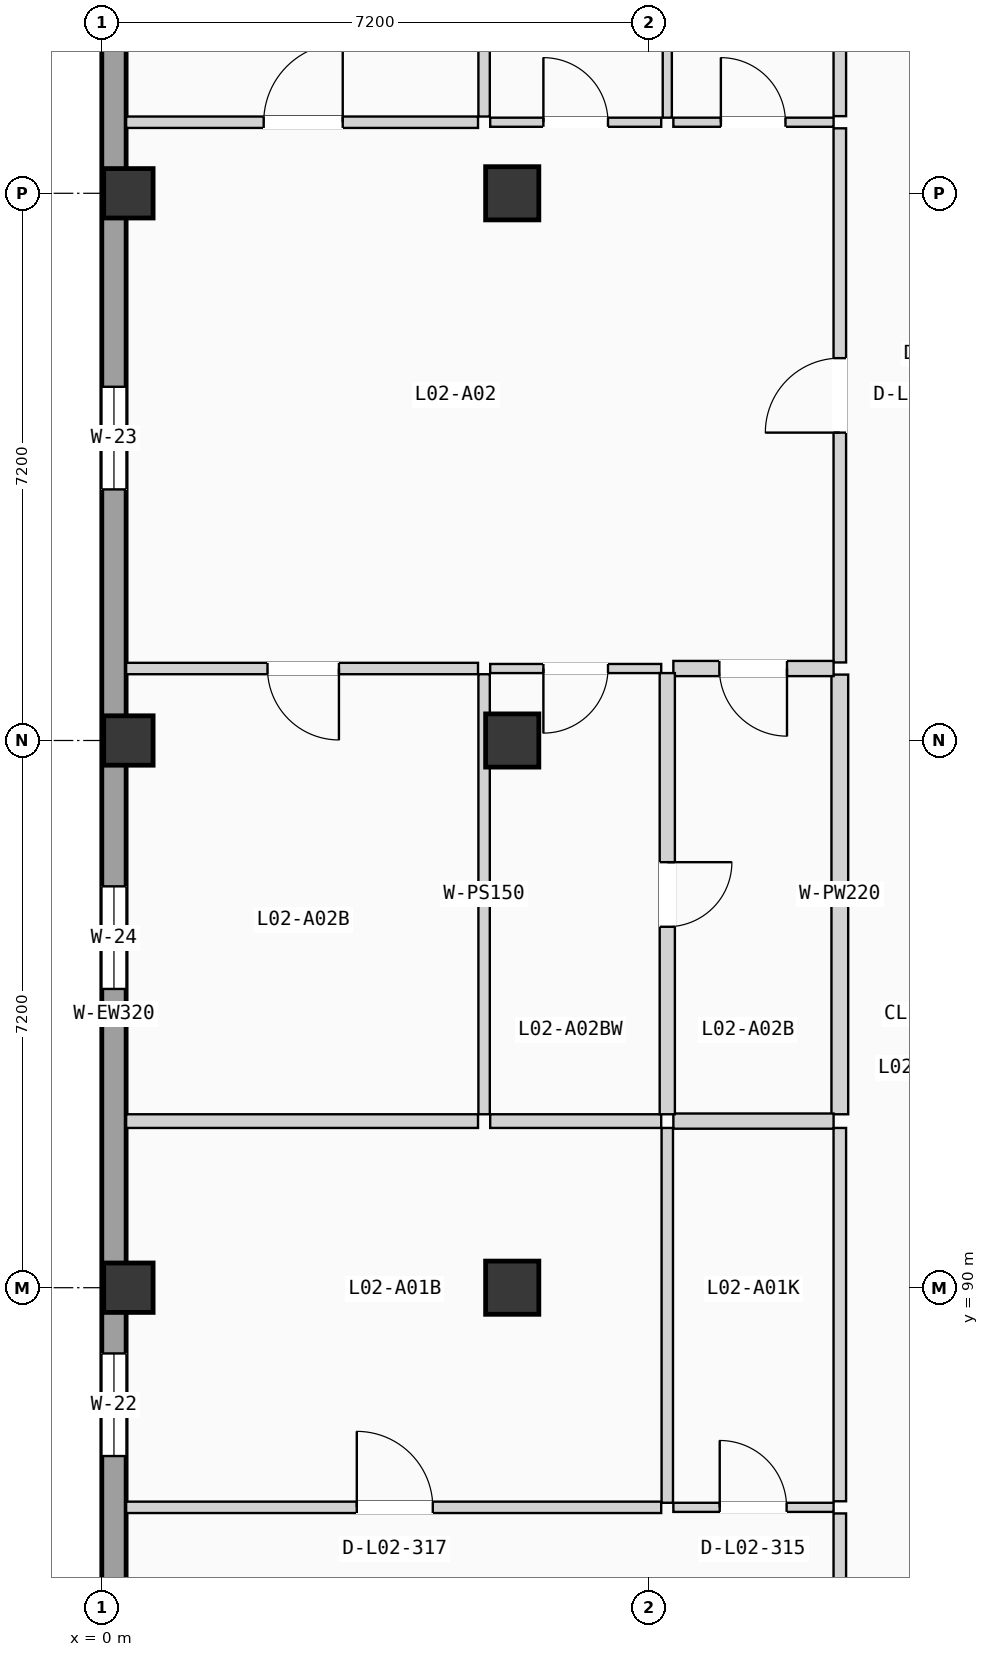
"""IFC4 building model, lengths in metres.
Left out: names, types, materials, properties, quantities, classifications, styles, units other than length and angle.
Written with IfcOpenShell. Run it as: python <this file> out.ifc"""

import sys

from ifc_helpers import new_model, si_unit, direction, frame, frame_2d, origin, origin_2d, place, context, subcontext, project, spatial, rectangle, extrude, element, fill, save


model = new_model("IFC4")
c1 = context("Model", 3, precision=1e-05, world=origin(), true_north=direction((0.0, 1.0)))
c2 = subcontext(c1, "Body", "Model", "MODEL_VIEW")
j1 = project(units=[si_unit("LENGTHUNIT", "METRE"), si_unit("PLANEANGLEUNIT", "RADIAN")], contexts=[c1])
p1 = place(None, origin())
s1 = spatial("IfcSite", under=j1, at=p1, CompositionType="ELEMENT")
p2 = place(p1, origin())
s2 = spatial("IfcBuilding", under=s1, at=p2, CompositionType="ELEMENT")
p3 = place(p2, frame((0.0, 0.0, 8.575)))
s3 = spatial("IfcBuildingStorey", under=s2, at=p3, CompositionType="ELEMENT", Elevation=8.575)
for number, where, z_axis, x_axis in (
    (1, (0.35, 90.0, 0.0), (0.0, 0.0, 1.0), (1.0, 0.0, 0.0)),
    (2, (0.35, 97.2, 0.0), (0.0, 0.0, 1.0), (1.0, 0.0, 0.0)),
    (3, (0.35, 104.4, 0.0), (0.0, 0.0, 1.0), (1.0, 0.0, 0.0)),
):
    element("IfcColumn", number, at=place(p3, frame(where, z_axis=z_axis, x_axis=x_axis)), inside=s3, PredefinedType="COLUMN", context=c2, shape_type="SweptSolid", body=[
        extrude(rectangle(XDim=0.65, YDim=0.65, at=origin_2d()), origin(), (0.0, 0.0, 1.0), 3.5),
    ])
for number, where, z_axis, x_axis in (
    (4, (5.4, 90.0, 0.0), (0.0, 0.0, 1.0), (1.0, 0.0, 0.0)),
    (5, (5.4, 97.2, 0.0), (0.0, 0.0, 1.0), (1.0, 0.0, 0.0)),
    (6, (5.4, 104.4, 0.0), (0.0, 0.0, 1.0), (1.0, 0.0, 0.0)),
):
    element("IfcColumn", number, at=place(p3, frame(where, z_axis=z_axis, x_axis=x_axis)), inside=s3, PredefinedType="COLUMN", context=c2, shape_type="SweptSolid", body=[
        extrude(rectangle(XDim=0.7, YDim=0.7, at=origin_2d()), origin(), (0.0, 0.0, 1.0), 3.5),
    ])
p4 = place(p3, frame((0.16, 68.72, 0.0), z_axis=(0.0, 0.0, 1.0), x_axis=(0.0, 1.0, 0.0)))
e7 = element("IfcWall", 7, at=p4, inside=s3, PredefinedType="SOLIDWALL", context=c2, shape_type="SweptSolid", body=[
    extrude(rectangle(XDim=49.76, YDim=0.32, at=frame_2d((24.88, 0.0))), origin(), (0.0, 0.0, 1.0), 3.24),
])
p5 = place(p4, frame((15.705, 0.0, 0.755)))
e8 = element("IfcOpeningElement", 8, at=p5, cuts=e7, PredefinedType="OPENING", context=c2, shape_type="SweptSolid", body=[
    extrude(rectangle(XDim=1.25, YDim=1.8, at=frame_2d((0.625, 0.9))), frame((0.0, 0.17, 0.0), z_axis=(0.0, -1.0, 0.0), x_axis=(1.0, 0.0, 0.0)), (0.0, 0.0, 1.0), 0.34),
])
p6 = place(p4, frame((9.061, 0.0, 0.9)))
e9 = element("IfcOpeningElement", 9, at=p6, cuts=e7, PredefinedType="OPENING", context=c2, shape_type="SweptSolid", body=[
    extrude(rectangle(XDim=1.35, YDim=1.2, at=frame_2d((0.675, 0.6))), frame((0.0, 0.17, 0.0), z_axis=(0.0, -1.0, 0.0), x_axis=(1.0, 0.0, 0.0)), (0.0, 0.0, 1.0), 0.34),
])
p7 = place(p4, frame((19.065, 0.0, 0.9)))
e10 = element("IfcOpeningElement", 10, at=p7, cuts=e7, PredefinedType="OPENING", context=c2, shape_type="SweptSolid", body=[
    extrude(rectangle(XDim=1.35, YDim=1.35, at=frame_2d((0.675, 0.675))), frame((0.0, 0.17, 0.0), z_axis=(0.0, -1.0, 0.0), x_axis=(1.0, 0.0, 0.0)), (0.0, 0.0, 1.0), 0.34),
])
p8 = place(p4, frame((31.784, 0.0, 0.9)))
e11 = element("IfcOpeningElement", 11, at=p8, cuts=e7, PredefinedType="OPENING", context=c2, shape_type="SweptSolid", body=[
    extrude(rectangle(XDim=1.35, YDim=1.5, at=frame_2d((0.675, 0.75))), frame((0.0, 0.17, 0.0), z_axis=(0.0, -1.0, 0.0), x_axis=(1.0, 0.0, 0.0)), (0.0, 0.0, 1.0), 0.34),
])
p9 = place(p4, frame((25.211, 0.0, 0.9)))
e12 = element("IfcOpeningElement", 12, at=p9, cuts=e7, PredefinedType="OPENING", context=c2, shape_type="SweptSolid", body=[
    extrude(rectangle(XDim=1.35, YDim=1.65, at=frame_2d((0.675, 0.825))), frame((0.0, 0.17, 0.0), z_axis=(0.0, -1.0, 0.0), x_axis=(1.0, 0.0, 0.0)), (0.0, 0.0, 1.0), 0.34),
])
p10 = place(p4, frame((38.913, 0.0, 0.755)))
e13 = element("IfcOpeningElement", 13, at=p10, cuts=e7, PredefinedType="OPENING", context=c2, shape_type="SweptSolid", body=[
    extrude(rectangle(XDim=1.35, YDim=1.8, at=frame_2d((0.675, 0.9))), frame((0.0, 0.17, 0.0), z_axis=(0.0, -1.0, 0.0), x_axis=(1.0, 0.0, 0.0)), (0.0, 0.0, 1.0), 0.34),
])
p11 = place(p3, frame((9.71, 81.072, 0.0), z_axis=(0.0, 0.0, 1.0), x_axis=(0.0, 1.0, 0.0)))
e14 = element("IfcWall", 14, at=p11, inside=s3, PredefinedType="PARTITIONING", context=c2, shape_type="SweptSolid", body=[
    extrude(rectangle(XDim=5.958, YDim=0.165, at=frame_2d((2.979, 0.0))), origin(), (0.0, 0.0, 1.0), 3.22),
])
p12 = place(p11, frame((2.489, 0.0, 0.0)))
e15 = element("IfcOpeningElement", 15, at=p12, cuts=e14, PredefinedType="OPENING", context=c2, shape_type="SweptSolid", body=[
    extrude(rectangle(XDim=0.98, YDim=2.08, at=frame_2d((0.49, 1.04))), frame((0.0, 0.093, 0.0), z_axis=(0.0, -1.0, 0.0), x_axis=(1.0, 0.0, 0.0)), (0.0, 0.0, 1.0), 0.185),
])
p13 = place(p3, frame((9.71, 87.19, 0.0), z_axis=(0.0, 0.0, 1.0), x_axis=(0.0, 1.0, 0.0)))
e16 = element("IfcWall", 16, at=p13, inside=s3, PredefinedType="PARTITIONING", context=c2, shape_type="SweptSolid", body=[
    extrude(rectangle(XDim=4.912, YDim=0.165, at=frame_2d((2.456, 0.0))), origin(), (0.0, 0.0, 1.0), 3.22),
])
p14 = place(p3, frame((9.71, 98.227, 0.0), z_axis=(0.0, 0.0, 1.0), x_axis=(0.0, 1.0, 0.0)))
e17 = element("IfcWall", 17, at=p14, inside=s3, PredefinedType="PARTITIONING", context=c2, shape_type="SweptSolid", body=[
    extrude(rectangle(XDim=7.028, YDim=0.165, at=frame_2d((3.514, 0.0))), origin(), (0.0, 0.0, 1.0), 3.22),
])
p15 = place(p14, frame((3.024, 0.0, 0.0)))
e18 = element("IfcOpeningElement", 18, at=p15, cuts=e17, PredefinedType="OPENING", context=c2, shape_type="SweptSolid", body=[
    extrude(rectangle(XDim=0.98, YDim=2.08, at=frame_2d((0.49, 1.04))), frame((0.0, 0.093, 0.0), z_axis=(0.0, -1.0, 0.0), x_axis=(1.0, 0.0, 0.0)), (0.0, 0.0, 1.0), 0.185),
])
p16 = place(p3, frame((9.71, 92.282, 0.0), z_axis=(0.0, 0.0, 1.0), x_axis=(0.0, 1.0, 0.0)))
e19 = element("IfcWall", 19, at=p16, inside=s3, PredefinedType="PLUMBINGWALL", context=c2, shape_type="SweptSolid", body=[
    extrude(rectangle(XDim=5.785, YDim=0.22, at=frame_2d((2.893, 0.0))), origin(), (0.0, 0.0, 1.0), 3.22),
])
p17 = place(p3, frame((9.71, 105.415, 0.0), z_axis=(0.0, 0.0, 1.0), x_axis=(0.0, 1.0, 0.0)))
e20 = element("IfcWall", 20, at=p17, inside=s3, PredefinedType="PARTITIONING", context=c2, shape_type="SweptSolid", body=[
    extrude(rectangle(XDim=5.785, YDim=0.165, at=frame_2d((2.893, 0.0))), origin(), (0.0, 0.0, 1.0), 3.22),
])
p18 = place(p3, frame((7.52, 87.11, 0.0), z_axis=(0.0, 0.0, 1.0), x_axis=(1.0, 0.0, 0.0)))
e21 = element("IfcWall", 21, at=p18, inside=s3, PredefinedType="PARTITIONING", context=c2, shape_type="SweptSolid", body=[
    extrude(rectangle(XDim=2.108, YDim=0.12, at=frame_2d((1.054, 0.0))), origin(), (0.0, 0.0, 1.0), 3.22),
])
p19 = place(p18, frame((0.61, 0.0, 0.0)))
e22 = element("IfcOpeningElement", 22, at=p19, cuts=e21, PredefinedType="OPENING", context=c2, shape_type="SweptSolid", body=[
    extrude(rectangle(XDim=0.88, YDim=2.02, at=frame_2d((0.44, 1.01))), frame((0.0, 0.07, 0.0), z_axis=(0.0, -1.0, 0.0), x_axis=(1.0, 0.0, 0.0)), (0.0, 0.0, 1.0), 0.14),
])
p20 = place(p3, frame((0.32, 87.11, 0.0), z_axis=(0.0, 0.0, 1.0), x_axis=(1.0, 0.0, 0.0)))
e23 = element("IfcWall", 23, at=p20, inside=s3, PredefinedType="PARTITIONING", context=c2, shape_type="SweptSolid", body=[
    extrude(rectangle(XDim=7.04, YDim=0.15, at=frame_2d((3.52, 0.0))), origin(), (0.0, 0.0, 1.0), 3.22),
])
p21 = place(p20, frame((3.035, 0.0, 0.0)))
e24 = element("IfcOpeningElement", 24, at=p21, cuts=e23, PredefinedType="OPENING", context=c2, shape_type="SweptSolid", body=[
    extrude(rectangle(XDim=1.0, YDim=2.06, at=frame_2d((0.5, 1.03))), frame((0.0, 0.085, 0.0), z_axis=(0.0, -1.0, 0.0), x_axis=(1.0, 0.0, 0.0)), (0.0, 0.0, 1.0), 0.17),
])
p22 = place(p3, frame((7.44, 87.17, 0.0), z_axis=(0.0, 0.0, 1.0), x_axis=(0.0, 1.0, 0.0)))
e25 = element("IfcWall", 25, at=p22, inside=s3, PredefinedType="PARTITIONING", context=c2, shape_type="SweptSolid", body=[
    extrude(rectangle(XDim=4.932, YDim=0.15, at=frame_2d((2.466, 0.0))), origin(), (0.0, 0.0, 1.0), 3.22),
])
p23 = place(p3, frame((7.52, 92.192, 0.0), z_axis=(0.0, 0.0, 1.0), x_axis=(1.0, 0.0, 0.0)))
e26 = element("IfcWall", 26, at=p23, inside=s3, PredefinedType="PLUMBINGWALL", context=c2, shape_type="SweptSolid", body=[
    extrude(rectangle(XDim=2.108, YDim=0.2, at=frame_2d((1.054, 0.0))), origin(), (0.0, 0.0, 1.0), 3.22),
])
p24 = place(p3, frame((0.32, 92.192, 0.0), z_axis=(0.0, 0.0, 1.0), x_axis=(1.0, 0.0, 0.0)))
e27 = element("IfcWall", 27, at=p24, inside=s3, PredefinedType="PARTITIONING", context=c2, shape_type="SweptSolid", body=[
    extrude(rectangle(XDim=4.63, YDim=0.18, at=frame_2d((2.315, 0.0))), origin(), (0.0, 0.0, 1.0), 3.22),
])
p25 = place(p3, frame((5.11, 92.192, 0.0), z_axis=(0.0, 0.0, 1.0), x_axis=(1.0, 0.0, 0.0)))
e28 = element("IfcWall", 28, at=p25, inside=s3, PredefinedType="PARTITIONING", context=c2, shape_type="SweptSolid", body=[
    extrude(rectangle(XDim=2.25, YDim=0.18, at=frame_2d((1.125, 0.0))), origin(), (0.0, 0.0, 1.0), 3.22),
])
p26 = place(p3, frame((7.52, 98.147, 0.0), z_axis=(0.0, 0.0, 1.0), x_axis=(1.0, 0.0, 0.0)))
e29 = element("IfcWall", 29, at=p26, inside=s3, PredefinedType="PLUMBINGWALL", context=c2, shape_type="SweptSolid", body=[
    extrude(rectangle(XDim=2.108, YDim=0.2, at=frame_2d((1.054, 0.0))), origin(), (0.0, 0.0, 1.0), 3.22),
])
p27 = place(p26, frame((0.605, 0.0, 0.0)))
e30 = element("IfcOpeningElement", 30, at=p27, cuts=e29, PredefinedType="OPENING", context=c2, shape_type="SweptSolid", body=[
    extrude(rectangle(XDim=0.89, YDim=2.03, at=frame_2d((0.445, 1.015))), frame((0.0, 0.11, 0.0), z_axis=(0.0, -1.0, 0.0), x_axis=(1.0, 0.0, 0.0)), (0.0, 0.0, 1.0), 0.22),
])
p28 = place(p3, frame((7.52, 105.335, 0.0), z_axis=(0.0, 0.0, 1.0), x_axis=(1.0, 0.0, 0.0)))
e31 = element("IfcWall", 31, at=p28, inside=s3, PredefinedType="PARTITIONING", context=c2, shape_type="SweptSolid", body=[
    extrude(rectangle(XDim=2.108, YDim=0.12, at=frame_2d((1.054, 0.0))), origin(), (0.0, 0.0, 1.0), 3.22),
])
p29 = place(p28, frame((0.625, 0.0, 0.0)))
e32 = element("IfcOpeningElement", 32, at=p29, cuts=e31, PredefinedType="OPENING", context=c2, shape_type="SweptSolid", body=[
    extrude(rectangle(XDim=0.85, YDim=2.01, at=frame_2d((0.425, 1.005))), frame((0.0, 0.07, 0.0), z_axis=(0.0, -1.0, 0.0), x_axis=(1.0, 0.0, 0.0)), (0.0, 0.0, 1.0), 0.14),
])
p30 = place(p3, frame((0.32, 98.147, 0.0), z_axis=(0.0, 0.0, 1.0), x_axis=(1.0, 0.0, 0.0)))
e33 = element("IfcWall", 33, at=p30, inside=s3, PredefinedType="PARTITIONING", context=c2, shape_type="SweptSolid", body=[
    extrude(rectangle(XDim=4.63, YDim=0.15, at=frame_2d((2.315, 0.0))), origin(), (0.0, 0.0, 1.0), 3.22),
])
p31 = place(p30, frame((1.86, 0.0, 0.0)))
e34 = element("IfcOpeningElement", 34, at=p31, cuts=e33, PredefinedType="OPENING", context=c2, shape_type="SweptSolid", body=[
    extrude(rectangle(XDim=0.94, YDim=2.06, at=frame_2d((0.47, 1.03))), frame((0.0, 0.085, 0.0), z_axis=(0.0, -1.0, 0.0), x_axis=(1.0, 0.0, 0.0)), (0.0, 0.0, 1.0), 0.17),
])
p32 = place(p3, frame((5.11, 98.147, 0.0), z_axis=(0.0, 0.0, 1.0), x_axis=(1.0, 0.0, 0.0)))
e35 = element("IfcWall", 35, at=p32, inside=s3, PredefinedType="PARTITIONING", context=c2, shape_type="SweptSolid", body=[
    extrude(rectangle(XDim=2.25, YDim=0.12, at=frame_2d((1.125, 0.0))), origin(), (0.0, 0.0, 1.0), 3.22),
])
p33 = place(p32, frame((0.7, 0.0, 0.0)))
e36 = element("IfcOpeningElement", 36, at=p33, cuts=e35, PredefinedType="OPENING", context=c2, shape_type="SweptSolid", body=[
    extrude(rectangle(XDim=0.85, YDim=2.01, at=frame_2d((0.425, 1.005))), frame((0.0, 0.07, 0.0), z_axis=(0.0, -1.0, 0.0), x_axis=(1.0, 0.0, 0.0)), (0.0, 0.0, 1.0), 0.14),
])
p34 = place(p3, frame((0.32, 105.335, 0.0), z_axis=(0.0, 0.0, 1.0), x_axis=(1.0, 0.0, 0.0)))
e37 = element("IfcWall", 37, at=p34, inside=s3, PredefinedType="PARTITIONING", context=c2, shape_type="SweptSolid", body=[
    extrude(rectangle(XDim=4.63, YDim=0.15, at=frame_2d((2.315, 0.0))), origin(), (0.0, 0.0, 1.0), 3.22),
])
p35 = place(p34, frame((1.81, 0.0, 0.0)))
e38 = element("IfcOpeningElement", 38, at=p35, cuts=e37, PredefinedType="OPENING", context=c2, shape_type="SweptSolid", body=[
    extrude(rectangle(XDim=1.04, YDim=2.08, at=frame_2d((0.52, 1.04))), frame((0.0, 0.085, 0.0), z_axis=(0.0, -1.0, 0.0), x_axis=(1.0, 0.0, 0.0)), (0.0, 0.0, 1.0), 0.17),
])
p36 = place(p3, frame((5.11, 105.335, 0.0), z_axis=(0.0, 0.0, 1.0), x_axis=(1.0, 0.0, 0.0)))
e39 = element("IfcWall", 39, at=p36, inside=s3, PredefinedType="PARTITIONING", context=c2, shape_type="SweptSolid", body=[
    extrude(rectangle(XDim=2.25, YDim=0.12, at=frame_2d((1.125, 0.0))), origin(), (0.0, 0.0, 1.0), 3.22),
])
p37 = place(p36, frame((0.7, 0.0, 0.0)))
e40 = element("IfcOpeningElement", 40, at=p37, cuts=e39, PredefinedType="OPENING", context=c2, shape_type="SweptSolid", body=[
    extrude(rectangle(XDim=0.85, YDim=2.01, at=frame_2d((0.425, 1.005))), frame((0.0, 0.07, 0.0), z_axis=(0.0, -1.0, 0.0), x_axis=(1.0, 0.0, 0.0)), (0.0, 0.0, 1.0), 0.14),
])
p38 = place(p3, frame((7.44, 92.282, 0.0), z_axis=(0.0, 0.0, 1.0), x_axis=(0.0, 1.0, 0.0)))
e41 = element("IfcWall", 41, at=p38, inside=s3, PredefinedType="PLUMBINGWALL", context=c2, shape_type="SweptSolid", body=[
    extrude(rectangle(XDim=5.805, YDim=0.2, at=frame_2d((2.902, 0.0))), origin(), (0.0, 0.0, 1.0), 3.22),
])
p39 = place(p38, frame((2.467, 0.0, 0.0)))
e42 = element("IfcOpeningElement", 42, at=p39, cuts=e41, PredefinedType="OPENING", context=c2, shape_type="SweptSolid", body=[
    extrude(rectangle(XDim=0.85, YDim=2.01, at=frame_2d((0.425, 1.005))), frame((0.0, 0.11, 0.0), z_axis=(0.0, -1.0, 0.0), x_axis=(1.0, 0.0, 0.0)), (0.0, 0.0, 1.0), 0.22),
])
p40 = place(p3, frame((7.44, 105.395, 0.0), z_axis=(0.0, 0.0, 1.0), x_axis=(0.0, 1.0, 0.0)))
e43 = element("IfcWall", 43, at=p40, inside=s3, PredefinedType="PARTITIONING", context=c2, shape_type="SweptSolid", body=[
    extrude(rectangle(XDim=5.805, YDim=0.12, at=frame_2d((2.902, 0.0))), origin(), (0.0, 0.0, 1.0), 3.22),
])
for number, where, z_axis, x_axis in (
    (44, (5.03, 92.282, 0.0), (0.0, 0.0, 1.0), (0.0, 1.0, 0.0)),
    (45, (5.03, 105.41, 0.0), (0.0, 0.0, 1.0), (0.0, 1.0, 0.0)),
):
    element("IfcWall", number, at=place(p3, frame(where, z_axis=z_axis, x_axis=x_axis)), inside=s3, PredefinedType="PARTITIONING", context=c2, shape_type="SweptSolid", body=[
        extrude(rectangle(XDim=5.79, YDim=0.15, at=frame_2d((2.895, 0.0))), origin(), (0.0, 0.0, 1.0), 3.22),
    ])
p41 = place(p7, origin())
e46 = element("IfcWindow", 46, at=p41, inside=s3, PartitioningType="SINGLE_PANEL", PredefinedType="WINDOW", context=c2, shape_type="SweptSolid", body=[
    extrude(rectangle(XDim=1.35, YDim=1.35, at=frame_2d((0.675, 0.675))), frame((0.0, 0.03, 0.0), z_axis=(0.0, -1.0, 0.0), x_axis=(1.0, 0.0, 0.0)), (0.0, 0.0, 1.0), 0.06),
])
fill(e10, e46)
p42 = place(p8, origin())
e47 = element("IfcWindow", 47, at=p42, inside=s3, PartitioningType="SINGLE_PANEL", PredefinedType="WINDOW", context=c2, shape_type="SweptSolid", body=[
    extrude(rectangle(XDim=1.35, YDim=1.5, at=frame_2d((0.675, 0.75))), frame((0.0, 0.03, 0.0), z_axis=(0.0, -1.0, 0.0), x_axis=(1.0, 0.0, 0.0)), (0.0, 0.0, 1.0), 0.06),
])
fill(e11, e47)
p43 = place(p9, origin())
e48 = element("IfcWindow", 48, at=p43, inside=s3, PartitioningType="SINGLE_PANEL", PredefinedType="WINDOW", context=c2, shape_type="SweptSolid", body=[
    extrude(rectangle(XDim=1.35, YDim=1.65, at=frame_2d((0.675, 0.825))), frame((0.0, 0.03, 0.0), z_axis=(0.0, -1.0, 0.0), x_axis=(1.0, 0.0, 0.0)), (0.0, 0.0, 1.0), 0.06),
])
fill(e12, e48)
p44 = place(p15, origin())
e49 = element("IfcDoor", 49, at=p44, inside=s3, OperationType="SINGLE_SWING_LEFT", PredefinedType="DOOR", context=c2, shape_type="SweptSolid", body=[
    extrude(rectangle(XDim=0.98, YDim=2.08, at=frame_2d((0.49, 1.04))), frame((0.0, 0.025, 0.0), z_axis=(0.0, -1.0, 0.0), x_axis=(1.0, 0.0, 0.0)), (0.0, 0.0, 1.0), 0.05),
])
fill(e18, e49)
p45 = place(p19, origin())
e50 = element("IfcDoor", 50, at=p45, inside=s3, OperationType="SINGLE_SWING_LEFT", PredefinedType="DOOR", context=c2, shape_type="SweptSolid", body=[
    extrude(rectangle(XDim=0.88, YDim=2.02, at=frame_2d((0.44, 1.01))), frame((0.0, 0.025, 0.0), z_axis=(0.0, -1.0, 0.0), x_axis=(1.0, 0.0, 0.0)), (0.0, 0.0, 1.0), 0.05),
])
fill(e22, e50)
p46 = place(p21, origin())
e51 = element("IfcDoor", 51, at=p46, inside=s3, OperationType="SINGLE_SWING_LEFT", PredefinedType="DOOR", context=c2, shape_type="SweptSolid", body=[
    extrude(rectangle(XDim=1.0, YDim=2.06, at=frame_2d((0.5, 1.03))), frame((0.0, 0.025, 0.0), z_axis=(0.0, -1.0, 0.0), x_axis=(1.0, 0.0, 0.0)), (0.0, 0.0, 1.0), 0.05),
])
fill(e24, e51)
p47 = place(p27, frame((0.89, 0.0, 0.0), z_axis=(0.0, 0.0, 1.0), x_axis=(-1.0, 0.0, 0.0)))
e52 = element("IfcDoor", 52, at=p47, inside=s3, OperationType="SINGLE_SWING_RIGHT", PredefinedType="DOOR", context=c2, shape_type="SweptSolid", body=[
    extrude(rectangle(XDim=0.89, YDim=2.03, at=frame_2d((0.445, 1.015))), frame((0.0, 0.025, 0.0), z_axis=(0.0, -1.0, 0.0), x_axis=(1.0, 0.0, 0.0)), (0.0, 0.0, 1.0), 0.05),
])
fill(e30, e52)
p48 = place(p29, origin())
e53 = element("IfcDoor", 53, at=p48, inside=s3, OperationType="SINGLE_SWING_LEFT", PredefinedType="DOOR", context=c2, shape_type="SweptSolid", body=[
    extrude(rectangle(XDim=0.85, YDim=2.01, at=frame_2d((0.425, 1.005))), frame((0.0, 0.025, 0.0), z_axis=(0.0, -1.0, 0.0), x_axis=(1.0, 0.0, 0.0)), (0.0, 0.0, 1.0), 0.05),
])
fill(e32, e53)
p49 = place(p31, frame((0.94, 0.0, 0.0), z_axis=(0.0, 0.0, 1.0), x_axis=(-1.0, 0.0, 0.0)))
e54 = element("IfcDoor", 54, at=p49, inside=s3, OperationType="SINGLE_SWING_RIGHT", PredefinedType="DOOR", context=c2, shape_type="SweptSolid", body=[
    extrude(rectangle(XDim=0.94, YDim=2.06, at=frame_2d((0.47, 1.03))), frame((0.0, 0.025, 0.0), z_axis=(0.0, -1.0, 0.0), x_axis=(1.0, 0.0, 0.0)), (0.0, 0.0, 1.0), 0.05),
])
fill(e34, e54)
p50 = place(p33, frame((0.85, 0.0, 0.0), z_axis=(0.0, 0.0, 1.0), x_axis=(-1.0, 0.0, 0.0)))
e55 = element("IfcDoor", 55, at=p50, inside=s3, OperationType="SINGLE_SWING_LEFT", PredefinedType="DOOR", context=c2, shape_type="SweptSolid", body=[
    extrude(rectangle(XDim=0.85, YDim=2.01, at=frame_2d((0.425, 1.005))), frame((0.0, 0.025, 0.0), z_axis=(0.0, -1.0, 0.0), x_axis=(1.0, 0.0, 0.0)), (0.0, 0.0, 1.0), 0.05),
])
fill(e36, e55)
p51 = place(p35, origin())
e56 = element("IfcDoor", 56, at=p51, inside=s3, OperationType="SINGLE_SWING_RIGHT", PredefinedType="DOOR", context=c2, shape_type="SweptSolid", body=[
    extrude(rectangle(XDim=1.04, YDim=2.08, at=frame_2d((0.52, 1.04))), frame((0.0, 0.025, 0.0), z_axis=(0.0, -1.0, 0.0), x_axis=(1.0, 0.0, 0.0)), (0.0, 0.0, 1.0), 0.05),
])
fill(e38, e56)
p52 = place(p37, origin())
e57 = element("IfcDoor", 57, at=p52, inside=s3, OperationType="SINGLE_SWING_LEFT", PredefinedType="DOOR", context=c2, shape_type="SweptSolid", body=[
    extrude(rectangle(XDim=0.85, YDim=2.01, at=frame_2d((0.425, 1.005))), frame((0.0, 0.025, 0.0), z_axis=(0.0, -1.0, 0.0), x_axis=(1.0, 0.0, 0.0)), (0.0, 0.0, 1.0), 0.05),
])
fill(e40, e57)
p53 = place(p39, frame((0.85, 0.0, 0.0), z_axis=(0.0, 0.0, 1.0), x_axis=(-1.0, 0.0, 0.0)))
e58 = element("IfcDoor", 58, at=p53, inside=s3, OperationType="SINGLE_SWING_RIGHT", PredefinedType="DOOR", context=c2, shape_type="SweptSolid", body=[
    extrude(rectangle(XDim=0.85, YDim=2.01, at=frame_2d((0.425, 1.005))), frame((0.0, 0.025, 0.0), z_axis=(0.0, -1.0, 0.0), x_axis=(1.0, 0.0, 0.0)), (0.0, 0.0, 1.0), 0.05),
])
fill(e42, e58)
save(model, sys.argv[1])
